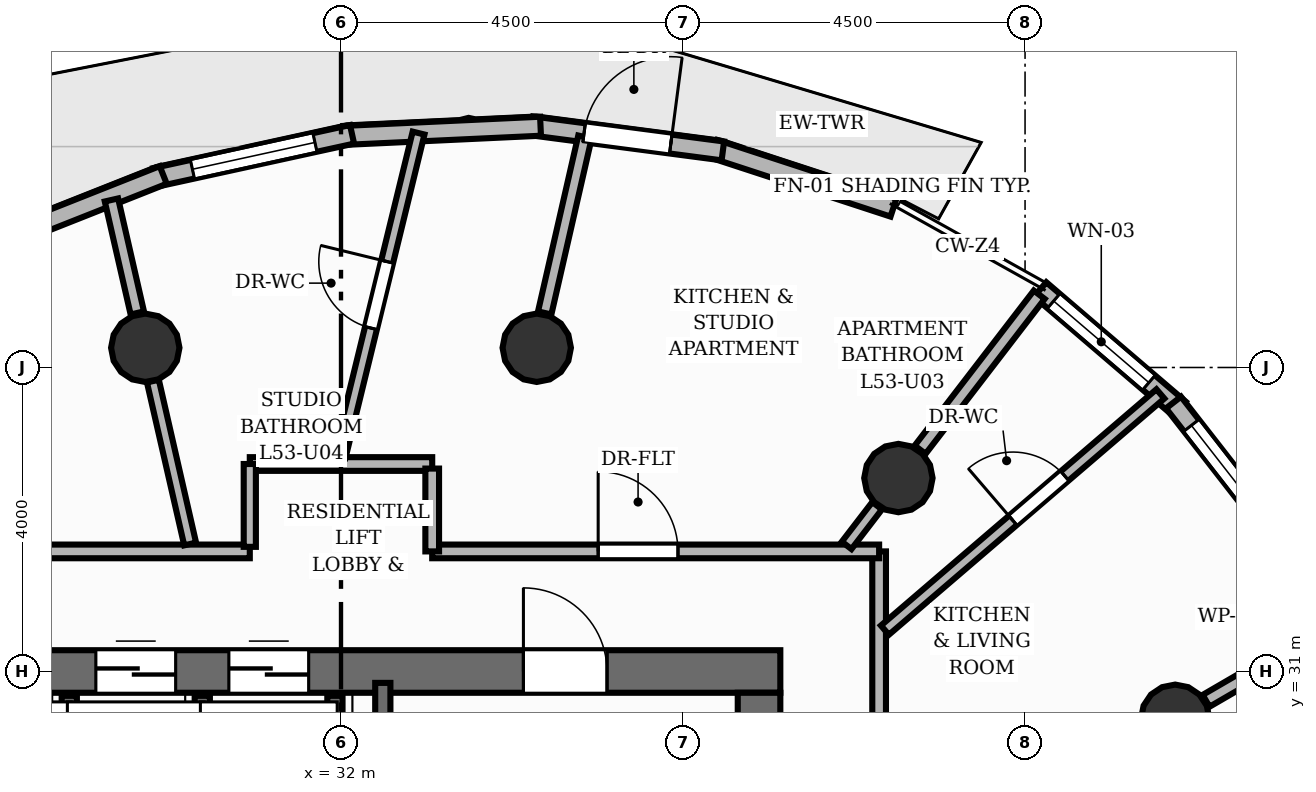
"""IFC4 building model, lengths in metres.
Left out: names, types, materials, properties, quantities, classifications, styles, units other than length and angle.
Written with IfcOpenShell. Run it as: python <this file> out.ifc"""

import sys

from ifc_helpers import new_model, si_unit, direction, frame, frame_2d, origin, origin_2d, place, context, subcontext, project, spatial, rectangle, circle, extrude, element, fill, save


model = new_model("IFC4")
c1 = context("Model", 3, precision=1e-05, world=origin(), true_north=direction((0.0, 1.0)))
c2 = subcontext(c1, "Body", "Model", "MODEL_VIEW")
j1 = project(units=[si_unit("LENGTHUNIT", "METRE"), si_unit("PLANEANGLEUNIT", "RADIAN")], contexts=[c1])
p1 = place(None, origin())
s1 = spatial("IfcSite", under=j1, at=p1, CompositionType="ELEMENT")
p2 = place(p1, origin())
s2 = spatial("IfcBuilding", under=s1, at=p2, CompositionType="ELEMENT")
p3 = place(p2, frame((0.0, 0.0, 179.04)))
s3 = spatial("IfcBuildingStorey", under=s2, at=p3, CompositionType="ELEMENT", Elevation=179.04)
p4 = place(p3, frame((26.22, 31.0, 0.0), z_axis=(0.0, 0.0, 1.0), x_axis=(1.0, 0.0, 0.0)))
e1 = element("IfcWall", 1, at=p4, inside=s3, PredefinedType="SHEAR", context=c2, shape_type="SweptSolid", body=[
    extrude(rectangle(XDim=11.56, YDim=0.56, at=frame_2d((5.78, 0.0))), origin(), (0.0, 0.0, 1.0), 3.2),
])
p5 = place(p4, frame((8.18, 0.0, 0.0)))
e2 = element("IfcOpeningElement", 2, at=p5, cuts=e1, PredefinedType="OPENING", context=c2, shape_type="SweptSolid", body=[
    extrude(rectangle(XDim=1.1, YDim=2.15, at=frame_2d((0.55, 1.075))), frame((0.0, 0.29, 0.0), z_axis=(0.0, -1.0, 0.0), x_axis=(1.0, 0.0, 0.0)), (0.0, 0.0, 1.0), 0.58),
])
p6 = place(p4, frame((0.805, 0.0, 0.0)))
e3 = element("IfcOpeningElement", 3, at=p6, cuts=e1, PredefinedType="OPENING", context=c2, shape_type="SweptSolid", body=[
    extrude(rectangle(XDim=1.05, YDim=2.15, at=frame_2d((0.525, 1.075))), frame((0.0, 0.29, 0.0), z_axis=(0.0, -1.0, 0.0), x_axis=(1.0, 0.0, 0.0)), (0.0, 0.0, 1.0), 0.58),
])
p7 = place(p4, frame((2.555, 0.0, 0.0)))
e4 = element("IfcOpeningElement", 4, at=p7, cuts=e1, PredefinedType="OPENING", context=c2, shape_type="SweptSolid", body=[
    extrude(rectangle(XDim=1.05, YDim=2.15, at=frame_2d((0.525, 1.075))), frame((0.0, 0.29, 0.0), z_axis=(0.0, -1.0, 0.0), x_axis=(1.0, 0.0, 0.0)), (0.0, 0.0, 1.0), 0.58),
])
p8 = place(p4, frame((4.305, 0.0, 0.0)))
e5 = element("IfcOpeningElement", 5, at=p8, cuts=e1, PredefinedType="OPENING", context=c2, shape_type="SweptSolid", body=[
    extrude(rectangle(XDim=1.05, YDim=2.15, at=frame_2d((0.525, 1.075))), frame((0.0, 0.29, 0.0), z_axis=(0.0, -1.0, 0.0), x_axis=(1.0, 0.0, 0.0)), (0.0, 0.0, 1.0), 0.58),
])
p9 = place(p3, frame((37.5, 17.28, 0.0), z_axis=(0.0, 0.0, 1.0), x_axis=(0.0, 1.0, 0.0)))
e6 = element("IfcWall", 6, at=p9, inside=s3, PredefinedType="SHEAR", context=c2, shape_type="SweptSolid", body=[
    extrude(rectangle(XDim=13.44, YDim=0.56, at=frame_2d((6.72, 0.0))), origin(), (0.0, 0.0, 1.0), 3.2),
])
for number, where, z_axis, x_axis in (
    (7, (42.975, 30.378, 0.0), (0.0, 0.0, 1.0), (1.0, 0.0, 0.0)),
    (8, (39.333, 33.545, 0.0), (0.0, 0.0, 1.0), (1.0, 0.0, 0.0)),
    (9, (34.575, 35.26, 0.0), (0.0, 0.0, 1.0), (1.0, 0.0, 0.0)),
    (10, (29.425, 35.26, 0.0), (0.0, 0.0, 1.0), (1.0, 0.0, 0.0)),
):
    element("IfcColumn", number, at=place(p3, frame(where, z_axis=z_axis, x_axis=x_axis)), inside=s3, PredefinedType="COLUMN", context=c2, shape_type="SweptSolid", body=[
        extrude(circle(Radius=0.45, at=origin_2d()), origin(), (0.0, 0.0, 1.0), 3.2),
    ])
p10 = place(p3, frame((41.198, 36.027, 0.0), z_axis=(0.0, 0.0, 1.0), x_axis=(0.759591927835, -0.65039995631, 0.0)))
e11 = element("IfcWall", 11, at=p10, inside=s3, PredefinedType="SOLIDWALL", context=c2, shape_type="SweptSolid", body=[
    extrude(rectangle(XDim=2.415, YDim=0.25, at=frame_2d((1.208, 0.0))), origin(), (0.0, 0.0, 1.0), 2.96),
])
p11 = place(p10, frame((0.234, 0.0, 0.85)))
e12 = element("IfcOpeningElement", 12, at=p11, cuts=e11, PredefinedType="OPENING", context=c2, shape_type="SweptSolid", body=[
    extrude(rectangle(XDim=1.65, YDim=1.52, at=frame_2d((0.825, 0.76))), frame((0.0, 0.135, 0.0), z_axis=(0.0, -1.0, 0.0), x_axis=(1.0, 0.0, 0.0)), (0.0, 0.0, 1.0), 0.27),
])
p12 = place(p3, frame((36.914, 37.875, 0.0), z_axis=(0.0, 0.0, 1.0), x_axis=(0.950422545433, -0.310961388491, 0.0)))
e13 = element("IfcWall", 13, at=p12, inside=s3, PredefinedType="SOLIDWALL", context=c2, shape_type="SweptSolid", body=[
    extrude(rectangle(XDim=2.478, YDim=0.25, at=frame_2d((1.239, 0.0))), origin(), (0.0, 0.0, 1.0), 2.96),
])
p13 = place(p3, frame((34.513, 38.179, 0.0), z_axis=(0.0, 0.0, 1.0), x_axis=(0.991491995227, -0.130167674176, 0.0)))
e14 = element("IfcWall", 14, at=p13, inside=s3, PredefinedType="SOLIDWALL", context=c2, shape_type="SweptSolid", body=[
    extrude(rectangle(XDim=2.532, YDim=0.25, at=frame_2d((1.266, 0.0))), origin(), (0.0, 0.0, 1.0), 2.96),
])
p14 = place(p13, frame((0.691, 0.0, 0.0)))
e15 = element("IfcOpeningElement", 15, at=p14, cuts=e14, PredefinedType="OPENING", context=c2, shape_type="SweptSolid", body=[
    extrude(rectangle(XDim=1.15, YDim=2.2, at=frame_2d((0.575, 1.1))), frame((0.0, 0.135, 0.0), z_axis=(0.0, -1.0, 0.0), x_axis=(1.0, 0.0, 0.0)), (0.0, 0.0, 1.0), 0.27),
])
p15 = place(p3, frame((32.036, 38.053, 0.0), z_axis=(0.0, 0.0, 1.0), x_axis=(0.998912652492, 0.046620946915, 0.0)))
e16 = element("IfcWall", 16, at=p15, inside=s3, PredefinedType="SOLIDWALL", context=c2, shape_type="SweptSolid", body=[
    extrude(rectangle(XDim=2.592, YDim=0.25, at=frame_2d((1.296, 0.0))), origin(), (0.0, 0.0, 1.0), 2.96),
])
p16 = place(p3, frame((29.556, 37.501, 0.0), z_axis=(0.0, 0.0, 1.0), x_axis=(0.976886196324, 0.213760051067, 0.0)))
e17 = element("IfcWall", 17, at=p16, inside=s3, PredefinedType="SOLIDWALL", context=c2, shape_type="SweptSolid", body=[
    extrude(rectangle(XDim=2.651, YDim=0.25, at=frame_2d((1.325, 0.0))), origin(), (0.0, 0.0, 1.0), 2.96),
])
p17 = place(p16, frame((0.501, 0.0, 0.85)))
e18 = element("IfcOpeningElement", 18, at=p17, cuts=e17, PredefinedType="OPENING", context=c2, shape_type="SweptSolid", body=[
    extrude(rectangle(XDim=1.65, YDim=1.55, at=frame_2d((0.825, 0.775))), frame((0.0, 0.135, 0.0), z_axis=(0.0, -1.0, 0.0), x_axis=(1.0, 0.0, 0.0)), (0.0, 0.0, 1.0), 0.27),
])
p18 = place(p3, frame((27.149, 36.538, 0.0), z_axis=(0.0, 0.0, 1.0), x_axis=(0.929693178164, 0.368334894459, 0.0)))
e19 = element("IfcWall", 19, at=p18, inside=s3, PredefinedType="SOLIDWALL", context=c2, shape_type="SweptSolid", body=[
    extrude(rectangle(XDim=2.702, YDim=0.25, at=frame_2d((1.351, 0.0))), origin(), (0.0, 0.0, 1.0), 2.96),
])
p19 = place(p3, frame((42.953, 34.539, 0.0), z_axis=(0.0, 0.0, 1.0), x_axis=(0.61468225386, -0.788774826417, 0.0)))
e20 = element("IfcWall", 20, at=p19, inside=s3, PredefinedType="SOLIDWALL", context=c2, shape_type="SweptSolid", body=[
    extrude(rectangle(XDim=2.415, YDim=0.25, at=frame_2d((1.208, 0.0))), origin(), (0.0, 0.0, 1.0), 2.96),
])
p20 = place(p19, frame((0.382, 0.0, 0.85)))
e21 = element("IfcOpeningElement", 21, at=p20, cuts=e20, PredefinedType="OPENING", context=c2, shape_type="SweptSolid", body=[
    extrude(rectangle(XDim=1.65, YDim=1.55, at=frame_2d((0.825, 0.775))), frame((0.0, 0.135, 0.0), z_axis=(0.0, -1.0, 0.0), x_axis=(1.0, 0.0, 0.0)), (0.0, 0.0, 1.0), 0.27),
])
p21 = place(p3, frame((32.55, 27.35, 0.0), z_axis=(0.0, 0.0, 1.0), x_axis=(0.0, 1.0, 0.0)))
e22 = element("IfcWall", 22, at=p21, inside=s3, PredefinedType="SHEAR", context=c2, shape_type="SweptSolid", body=[
    extrude(rectangle(XDim=3.5, YDim=0.2, at=frame_2d((1.75, 0.0))), origin(), (0.0, 0.0, 1.0), 3.2),
])
for number, where, z_axis, x_axis in (
    (23, (31.92, 29.02, 0.0), (0.0, 0.0, 1.0), (0.0, 1.0, 0.0)),
    (24, (28.425, 29.02, 0.0), (0.0, 0.0, 1.0), (0.0, 1.0, 0.0)),
    (25, (30.175, 29.02, 0.0), (0.0, 0.0, 1.0), (0.0, 1.0, 0.0)),
):
    element("IfcWall", number, at=place(p3, frame(where, z_axis=z_axis, x_axis=x_axis)), inside=s3, PredefinedType="SHEAR", context=c2, shape_type="SweptSolid", body=[
        extrude(rectangle(XDim=1.66, YDim=0.2, at=frame_2d((0.83, 0.0))), origin(), (0.0, 0.0, 1.0), 3.2),
    ])
p22 = place(p3, frame((43.382, 30.614, 0.0), z_axis=(0.0, 0.0, 1.0), x_axis=(0.86456661279, 0.502518230563, 0.0)))
e26 = element("IfcWall", 26, at=p22, inside=s3, PredefinedType="PARTITIONING", context=c2, shape_type="SweptSolid", body=[
    extrude(rectangle(XDim=1.785, YDim=0.18, at=frame_2d((0.893, 0.0))), origin(), (0.0, 0.0, 1.0), 2.403),
])
p23 = place(p3, frame((39.62, 33.918, 0.0), z_axis=(0.0, 0.0, 1.0), x_axis=(0.609164681512, 0.793043750873, 0.0)))
e27 = element("IfcWall", 27, at=p23, inside=s3, PredefinedType="PARTITIONING", context=c2, shape_type="SweptSolid", body=[
    extrude(rectangle(XDim=2.572, YDim=0.18, at=frame_2d((1.286, 0.0))), origin(), (0.0, 0.0, 1.0), 2.403),
])
p24 = place(p3, frame((34.68, 35.718, 0.0), z_axis=(0.0, 0.0, 1.0), x_axis=(0.223011847659, 0.974815734282, 0.0)))
e28 = element("IfcWall", 28, at=p24, inside=s3, PredefinedType="PARTITIONING", context=c2, shape_type="SweptSolid", body=[
    extrude(rectangle(XDim=2.375, YDim=0.18, at=frame_2d((1.187, 0.0))), origin(), (0.0, 0.0, 1.0), 2.403),
])
p25 = place(p3, frame((29.32, 35.718, 0.0), z_axis=(0.0, 0.0, 1.0), x_axis=(-0.222976920769, 0.974823723965, 0.0)))
e29 = element("IfcWall", 29, at=p25, inside=s3, PredefinedType="PARTITIONING", context=c2, shape_type="SweptSolid", body=[
    extrude(rectangle(XDim=1.525, YDim=0.18, at=frame_2d((0.763, 0.0))), origin(), (0.0, 0.0, 1.0), 2.403),
])
p26 = place(p3, frame((39.08, 32.58, 0.0), z_axis=(0.0, 0.0, 1.0), x_axis=(0.0, -1.0, 0.0)))
e30 = element("IfcWall", 30, at=p26, inside=s3, PredefinedType="PARTITIONING", context=c2, shape_type="SweptSolid", body=[
    extrude(rectangle(XDim=4.468, YDim=0.18, at=frame_2d((2.234, 0.0))), origin(), (0.0, 0.0, 1.0), 2.955),
])
p27 = place(p26, frame((2.246, 0.0, 0.0)))
e31 = element("IfcOpeningElement", 31, at=p27, cuts=e30, PredefinedType="OPENING", context=c2, shape_type="SweptSolid", body=[
    extrude(rectangle(XDim=1.05, YDim=2.15, at=frame_2d((0.525, 1.075))), frame((0.0, 0.1, 0.0), z_axis=(0.0, -1.0, 0.0), x_axis=(1.0, 0.0, 0.0)), (0.0, 0.0, 1.0), 0.2),
])
p28 = place(p3, frame((33.2, 32.58, 0.0), z_axis=(0.0, 0.0, 1.0), x_axis=(1.0, 0.0, 0.0)))
e32 = element("IfcWall", 32, at=p28, inside=s3, PredefinedType="PARTITIONING", context=c2, shape_type="SweptSolid", body=[
    extrude(rectangle(XDim=5.88, YDim=0.18, at=frame_2d((2.94, 0.0))), origin(), (0.0, 0.0, 1.0), 2.955),
])
p29 = place(p28, frame((2.184, 0.0, 0.0)))
e33 = element("IfcOpeningElement", 33, at=p29, cuts=e32, PredefinedType="OPENING", context=c2, shape_type="SweptSolid", body=[
    extrude(rectangle(XDim=1.05, YDim=2.15, at=frame_2d((0.525, 1.075))), frame((0.0, 0.1, 0.0), z_axis=(0.0, -1.0, 0.0), x_axis=(1.0, 0.0, 0.0)), (0.0, 0.0, 1.0), 0.2),
])
p30 = place(p3, frame((30.8, 33.73, 0.0), z_axis=(0.0, 0.0, 1.0), x_axis=(1.0, 0.0, 0.0)))
e34 = element("IfcWall", 34, at=p30, inside=s3, PredefinedType="PARTITIONING", context=c2, shape_type="SweptSolid", body=[
    extrude(rectangle(XDim=2.4, YDim=0.18, at=frame_2d((1.2, 0.0))), origin(), (0.0, 0.0, 1.0), 2.955),
])
p31 = place(p3, frame((33.2, 33.67, 0.0), z_axis=(0.0, 0.0, 1.0), x_axis=(0.0, -1.0, 0.0)))
e35 = element("IfcWall", 35, at=p31, inside=s3, PredefinedType="PARTITIONING", context=c2, shape_type="SweptSolid", body=[
    extrude(rectangle(XDim=1.09, YDim=0.18, at=frame_2d((0.545, 0.0))), origin(), (0.0, 0.0, 1.0), 2.955),
])
p32 = place(p3, frame((24.92, 32.58, 0.0), z_axis=(0.0, 0.0, 1.0), x_axis=(1.0, 0.0, 0.0)))
e36 = element("IfcWall", 36, at=p32, inside=s3, PredefinedType="PARTITIONING", context=c2, shape_type="SweptSolid", body=[
    extrude(rectangle(XDim=5.88, YDim=0.18, at=frame_2d((2.94, 0.0))), origin(), (0.0, 0.0, 1.0), 2.955),
])
p33 = place(p3, frame((30.8, 32.64, 0.0), z_axis=(0.0, 0.0, 1.0), x_axis=(0.0, 1.0, 0.0)))
e37 = element("IfcWall", 37, at=p33, inside=s3, PredefinedType="PLUMBINGWALL", context=c2, shape_type="SweptSolid", body=[
    extrude(rectangle(XDim=1.09, YDim=0.16, at=frame_2d((0.545, 0.0))), origin(), (0.0, 0.0, 1.0), 2.955),
])
p34 = place(p3, frame((39.156, 31.544, 0.0), z_axis=(0.0, 0.0, 1.0), x_axis=(0.759083333315, 0.650993466238, 0.0)))
e38 = element("IfcWall", 38, at=p34, inside=s3, PredefinedType="PLUMBINGWALL", context=c2, shape_type="SweptSolid", body=[
    extrude(rectangle(XDim=4.775, YDim=0.16, at=frame_2d((2.387, 0.0))), origin(), (0.0, 0.0, 1.0), 2.955),
])
p35 = place(p34, frame((2.217, 0.0, 0.0)))
e39 = element("IfcOpeningElement", 39, at=p35, cuts=e38, PredefinedType="OPENING", context=c2, shape_type="SweptSolid", body=[
    extrude(rectangle(XDim=0.9, YDim=2.1, at=frame_2d((0.45, 1.05))), frame((0.0, 0.09, 0.0), z_axis=(0.0, -1.0, 0.0), x_axis=(1.0, 0.0, 0.0)), (0.0, 0.0, 1.0), 0.18),
])
p36 = place(p3, frame((38.653, 32.659, 0.0), z_axis=(0.0, 0.0, 1.0), x_axis=(0.609101063055, 0.79309261438, 0.0)))
e40 = element("IfcWall", 40, at=p36, inside=s3, PredefinedType="PLUMBINGWALL", context=c2, shape_type="SweptSolid", body=[
    extrude(rectangle(XDim=0.658, YDim=0.16, at=frame_2d((0.329, 0.0))), origin(), (0.0, 0.0, 1.0), 2.403),
])
p37 = place(p3, frame((31.981, 33.827, 0.0), z_axis=(0.0, 0.0, 1.0), x_axis=(0.237157525666, 0.971471208024, 0.0)))
e41 = element("IfcWall", 41, at=p37, inside=s3, PredefinedType="PLUMBINGWALL", context=c2, shape_type="SweptSolid", body=[
    extrude(rectangle(XDim=4.382, YDim=0.16, at=frame_2d((2.191, 0.0))), origin(), (0.0, 0.0, 1.0), 2.955),
])
p38 = place(p37, frame((1.741, 0.0, 0.0)))
e42 = element("IfcOpeningElement", 42, at=p38, cuts=e41, PredefinedType="OPENING", context=c2, shape_type="SweptSolid", body=[
    extrude(rectangle(XDim=0.9, YDim=2.1, at=frame_2d((0.45, 1.05))), frame((0.0, 0.09, 0.0), z_axis=(0.0, -1.0, 0.0), x_axis=(1.0, 0.0, 0.0)), (0.0, 0.0, 1.0), 0.18),
])
p39 = place(p3, frame((30.015, 32.677, 0.0), z_axis=(0.0, 0.0, 1.0), x_axis=(-0.222969522248, 0.974825416241, 0.0)))
e43 = element("IfcWall", 43, at=p39, inside=s3, PredefinedType="PLUMBINGWALL", context=c2, shape_type="SweptSolid", body=[
    extrude(rectangle(XDim=2.199, YDim=0.16, at=frame_2d((1.099, 0.0))), origin(), (0.0, 0.0, 1.0), 2.403),
])
p40 = place(p14, origin())
e44 = element("IfcDoor", 44, at=p40, inside=s3, OperationType="SINGLE_SWING_RIGHT", PredefinedType="DOOR", context=c2, shape_type="SweptSolid", body=[
    extrude(rectangle(XDim=1.15, YDim=2.2, at=frame_2d((0.575, 1.1))), frame((0.0, 0.025, 0.0), z_axis=(0.0, -1.0, 0.0), x_axis=(1.0, 0.0, 0.0)), (0.0, 0.0, 1.0), 0.05),
])
fill(e15, e44)
p41 = place(p11, origin())
e45 = element("IfcWindow", 45, at=p41, inside=s3, PartitioningType="SINGLE_PANEL", PredefinedType="WINDOW", context=c2, shape_type="SweptSolid", body=[
    extrude(rectangle(XDim=1.65, YDim=1.52, at=frame_2d((0.825, 0.76))), frame((0.0, 0.03, 0.0), z_axis=(0.0, -1.0, 0.0), x_axis=(1.0, 0.0, 0.0)), (0.0, 0.0, 1.0), 0.06),
])
fill(e12, e45)
p42 = place(p17, origin())
e46 = element("IfcWindow", 46, at=p42, inside=s3, PartitioningType="SINGLE_PANEL", PredefinedType="WINDOW", context=c2, shape_type="SweptSolid", body=[
    extrude(rectangle(XDim=1.65, YDim=1.55, at=frame_2d((0.825, 0.775))), frame((0.0, 0.03, 0.0), z_axis=(0.0, -1.0, 0.0), x_axis=(1.0, 0.0, 0.0)), (0.0, 0.0, 1.0), 0.06),
])
fill(e18, e46)
p43 = place(p20, origin())
e47 = element("IfcWindow", 47, at=p43, inside=s3, PartitioningType="SINGLE_PANEL", PredefinedType="WINDOW", context=c2, shape_type="SweptSolid", body=[
    extrude(rectangle(XDim=1.65, YDim=1.55, at=frame_2d((0.825, 0.775))), frame((0.0, 0.03, 0.0), z_axis=(0.0, -1.0, 0.0), x_axis=(1.0, 0.0, 0.0)), (0.0, 0.0, 1.0), 0.06),
])
fill(e21, e47)
p44 = place(p5, origin())
e48 = element("IfcDoor", 48, at=p44, inside=s3, OperationType="SINGLE_SWING_LEFT", PredefinedType="DOOR", context=c2, shape_type="SweptSolid", body=[
    extrude(rectangle(XDim=1.1, YDim=2.15, at=frame_2d((0.55, 1.075))), frame((0.0, 0.025, 0.0), z_axis=(0.0, -1.0, 0.0), x_axis=(1.0, 0.0, 0.0)), (0.0, 0.0, 1.0), 0.05),
])
fill(e2, e48)
p45 = place(p7, origin())
e49 = element("IfcDoor", 49, at=p45, inside=s3, OperationType="DOUBLE_DOOR_SLIDING", PredefinedType="DOOR", context=c2, shape_type="SweptSolid", body=[
    extrude(rectangle(XDim=1.05, YDim=2.15, at=frame_2d((0.525, 1.075))), frame((0.0, 0.025, 0.0), z_axis=(0.0, -1.0, 0.0), x_axis=(1.0, 0.0, 0.0)), (0.0, 0.0, 1.0), 0.05),
])
fill(e4, e49)
p46 = place(p8, origin())
e50 = element("IfcDoor", 50, at=p46, inside=s3, OperationType="DOUBLE_DOOR_SLIDING", PredefinedType="DOOR", context=c2, shape_type="SweptSolid", body=[
    extrude(rectangle(XDim=1.05, YDim=2.15, at=frame_2d((0.525, 1.075))), frame((0.0, 0.025, 0.0), z_axis=(0.0, -1.0, 0.0), x_axis=(1.0, 0.0, 0.0)), (0.0, 0.0, 1.0), 0.05),
])
fill(e5, e50)
p47 = place(p35, origin())
e51 = element("IfcDoor", 51, at=p47, inside=s3, OperationType="SINGLE_SWING_LEFT", PredefinedType="DOOR", context=c2, shape_type="SweptSolid", body=[
    extrude(rectangle(XDim=0.9, YDim=2.1, at=frame_2d((0.45, 1.05))), frame((0.0, 0.025, 0.0), z_axis=(0.0, -1.0, 0.0), x_axis=(1.0, 0.0, 0.0)), (0.0, 0.0, 1.0), 0.05),
])
fill(e39, e51)
p48 = place(p29, origin())
e52 = element("IfcDoor", 52, at=p48, inside=s3, OperationType="SINGLE_SWING_LEFT", PredefinedType="DOOR", context=c2, shape_type="SweptSolid", body=[
    extrude(rectangle(XDim=1.05, YDim=2.15, at=frame_2d((0.525, 1.075))), frame((0.0, 0.025, 0.0), z_axis=(0.0, -1.0, 0.0), x_axis=(1.0, 0.0, 0.0)), (0.0, 0.0, 1.0), 0.05),
])
fill(e33, e52)
p49 = place(p38, origin())
e53 = element("IfcDoor", 53, at=p49, inside=s3, OperationType="SINGLE_SWING_RIGHT", PredefinedType="DOOR", context=c2, shape_type="SweptSolid", body=[
    extrude(rectangle(XDim=0.9, YDim=2.1, at=frame_2d((0.45, 1.05))), frame((0.0, 0.025, 0.0), z_axis=(0.0, -1.0, 0.0), x_axis=(1.0, 0.0, 0.0)), (0.0, 0.0, 1.0), 0.05),
])
fill(e42, e53)
save(model, sys.argv[1])
